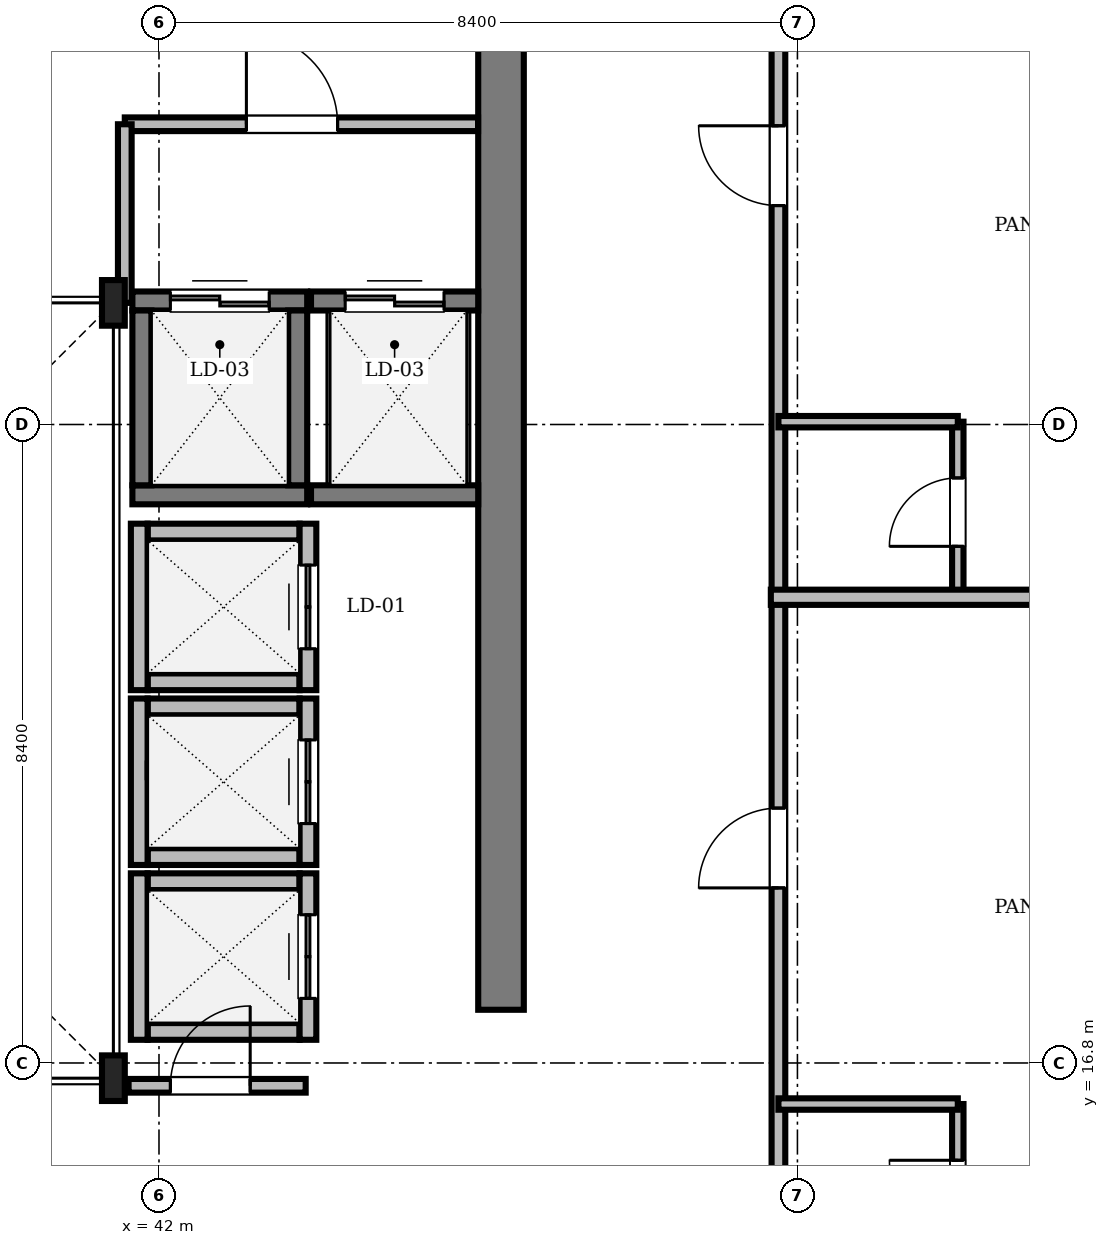
"""IFC4 building model, lengths in metres.
Left out: names, types, materials, properties, quantities, classifications, styles, units other than length and angle.
Written with IfcOpenShell. Run it as: python <this file> out.ifc"""

import sys

from ifc_helpers import new_model, si_unit, direction, frame, frame_2d, origin, origin_2d, place, context, subcontext, project, spatial, rectangle, i_section, extrude, source, transform, mapped, element, fill, save


model = new_model("IFC4")
c1 = context("Model", 3, precision=1e-05, world=origin(), true_north=direction((0.0, 1.0)))
c2 = subcontext(c1, "Body", "Model", "MODEL_VIEW")
j1 = project(units=[si_unit("LENGTHUNIT", "METRE"), si_unit("PLANEANGLEUNIT", "RADIAN")], contexts=[c1])
p1 = place(None, origin())
s1 = spatial("IfcSite", under=j1, at=p1, CompositionType="ELEMENT")
p2 = place(p1, origin())
s2 = spatial("IfcBuilding", under=s1, at=p2, CompositionType="ELEMENT")
p3 = place(p2, frame((0.0, 0.0, 274.3)))
s3 = spatial("IfcBuildingStorey", under=s2, at=p3, CompositionType="ELEMENT", Elevation=274.3)
m1 = source(origin(), c2, "Body", "SweptSolid", [
    extrude(rectangle(XDim=13.15, YDim=0.6, at=frame_2d((6.575, 0.0))), origin(), (0.0, 0.0, 1.0), 3.3),
])
p4 = place(p3, frame((46.5, 17.5, 0.0), z_axis=(0.0, 0.0, 1.0), x_axis=(0.0, 1.0, 0.0)))
e1 = element("IfcWall", 1, at=p4, inside=s3, PredefinedType="SHEAR", context=c2, shape_type="MappedRepresentation", body=[
    mapped(m1, transform((0.0, 0.0, 0.0), scale=1.0)),
])
m2 = source(origin(), c2, "Body", "SweptSolid", [
    extrude(i_section(OverallWidth=0.3, OverallDepth=0.6, WebThickness=0.015, FlangeThickness=0.03, FilletRadius=0.027, at=origin_2d()), origin(), (0.0, 0.0, 1.0), 3.3),
])
for number, where, z_axis, x_axis in (
    (2, (41.4, 16.6, 0.0), (0.0, 0.0, 1.0), (1.0, 0.0, 0.0)),
    (3, (41.4, 26.8, 0.0), (0.0, 0.0, 1.0), (1.0, 0.0, 0.0)),
):
    element("IfcColumn", number, at=place(p3, frame(where, z_axis=z_axis, x_axis=x_axis)), inside=s3, PredefinedType="COLUMN", context=c2, shape_type="MappedRepresentation", body=[
        mapped(m2, transform((0.0, 0.0, 0.0), scale=1.0)),
    ])
m3 = source(origin(), c2, "Body", "SweptSolid", [
    extrude(rectangle(XDim=2.0, YDim=0.22, at=frame_2d((1.0, 0.0))), origin(), (0.0, 0.0, 1.0), 3.3),
])
for number, where, z_axis, x_axis in (
    (4, (41.85, 21.815, 0.0), (0.0, 0.0, 1.0), (1.0, 0.0, 0.0)),
    (5, (41.85, 23.785, 0.0), (0.0, 0.0, 1.0), (1.0, 0.0, 0.0)),
):
    element("IfcWall", number, at=place(p3, frame(where, z_axis=z_axis, x_axis=x_axis)), inside=s3, PredefinedType="SOLIDWALL", context=c2, shape_type="MappedRepresentation", body=[
        mapped(m3, transform((0.0, 0.0, 0.0), scale=1.0)),
    ])
m4 = source(origin(), c2, "Body", "SweptSolid", [
    extrude(rectangle(XDim=2.19, YDim=0.22, at=frame_2d((1.095, 0.0))), origin(), (0.0, 0.0, 1.0), 3.3),
])
p5 = place(p3, frame((41.74, 21.705, 0.0), z_axis=(0.0, 0.0, 1.0), x_axis=(0.0, 1.0, 0.0)))
e6 = element("IfcWall", 6, at=p5, inside=s3, PredefinedType="SOLIDWALL", context=c2, shape_type="MappedRepresentation", body=[
    mapped(m4, transform((0.0, 0.0, 0.0), scale=1.0)),
])
p6 = place(p3, frame((43.96, 21.705, 0.0), z_axis=(0.0, 0.0, 1.0), x_axis=(0.0, 1.0, 0.0)))
e7 = element("IfcWall", 7, at=p6, inside=s3, PredefinedType="SOLIDWALL", context=c2, shape_type="MappedRepresentation", body=[
    mapped(m4, transform((0.0, 0.0, 0.0), scale=1.0)),
])
m5 = source(origin(), c2, "Body", "SweptSolid", [
    extrude(rectangle(XDim=1.1, YDim=2.2, at=frame_2d((0.55, 1.1))), frame((0.0, 0.12, 0.0), z_axis=(0.0, -1.0, 0.0), x_axis=(1.0, 0.0, 0.0)), (0.0, 0.0, 1.0), 0.24),
])
p7 = place(p6, frame((0.545, 0.0, 0.0)))
e8 = element("IfcOpeningElement", 8, at=p7, cuts=e7, PredefinedType="OPENING", context=c2, shape_type="MappedRepresentation", body=[
    mapped(m5, transform((0.0, 0.0, 0.0), scale=1.0)),
])
for number, where, z_axis, x_axis in (
    (9, (41.85, 19.515, 0.0), (0.0, 0.0, 1.0), (1.0, 0.0, 0.0)),
    (10, (41.85, 21.485, 0.0), (0.0, 0.0, 1.0), (1.0, 0.0, 0.0)),
):
    element("IfcWall", number, at=place(p3, frame(where, z_axis=z_axis, x_axis=x_axis)), inside=s3, PredefinedType="SOLIDWALL", context=c2, shape_type="MappedRepresentation", body=[
        mapped(m3, transform((0.0, 0.0, 0.0), scale=1.0)),
    ])
p8 = place(p3, frame((41.74, 19.405, 0.0), z_axis=(0.0, 0.0, 1.0), x_axis=(0.0, 1.0, 0.0)))
e11 = element("IfcWall", 11, at=p8, inside=s3, PredefinedType="SOLIDWALL", context=c2, shape_type="MappedRepresentation", body=[
    mapped(m4, transform((0.0, 0.0, 0.0), scale=1.0)),
])
p9 = place(p3, frame((43.96, 19.405, 0.0), z_axis=(0.0, 0.0, 1.0), x_axis=(0.0, 1.0, 0.0)))
e12 = element("IfcWall", 12, at=p9, inside=s3, PredefinedType="SOLIDWALL", context=c2, shape_type="MappedRepresentation", body=[
    mapped(m4, transform((0.0, 0.0, 0.0), scale=1.0)),
])
p10 = place(p9, frame((0.545, 0.0, 0.0)))
e13 = element("IfcOpeningElement", 13, at=p10, cuts=e12, PredefinedType="OPENING", context=c2, shape_type="MappedRepresentation", body=[
    mapped(m5, transform((0.0, 0.0, 0.0), scale=1.0)),
])
for number, where, z_axis, x_axis in (
    (14, (41.85, 17.215, 0.0), (0.0, 0.0, 1.0), (1.0, 0.0, 0.0)),
    (15, (41.85, 19.185, 0.0), (0.0, 0.0, 1.0), (1.0, 0.0, 0.0)),
):
    element("IfcWall", number, at=place(p3, frame(where, z_axis=z_axis, x_axis=x_axis)), inside=s3, PredefinedType="SOLIDWALL", context=c2, shape_type="MappedRepresentation", body=[
        mapped(m3, transform((0.0, 0.0, 0.0), scale=1.0)),
    ])
p11 = place(p3, frame((41.74, 17.105, 0.0), z_axis=(0.0, 0.0, 1.0), x_axis=(0.0, 1.0, 0.0)))
e16 = element("IfcWall", 16, at=p11, inside=s3, PredefinedType="SOLIDWALL", context=c2, shape_type="MappedRepresentation", body=[
    mapped(m4, transform((0.0, 0.0, 0.0), scale=1.0)),
])
p12 = place(p3, frame((43.96, 17.105, 0.0), z_axis=(0.0, 0.0, 1.0), x_axis=(0.0, 1.0, 0.0)))
e17 = element("IfcWall", 17, at=p12, inside=s3, PredefinedType="SOLIDWALL", context=c2, shape_type="MappedRepresentation", body=[
    mapped(m4, transform((0.0, 0.0, 0.0), scale=1.0)),
])
p13 = place(p12, frame((0.545, 0.0, 0.0)))
e18 = element("IfcOpeningElement", 18, at=p13, cuts=e17, PredefinedType="OPENING", context=c2, shape_type="MappedRepresentation", body=[
    mapped(m5, transform((0.0, 0.0, 0.0), scale=1.0)),
])
m6 = source(origin(), c2, "Body", "SweptSolid", [
    extrude(rectangle(XDim=2.3, YDim=0.25, at=frame_2d((1.15, 0.0))), origin(), (0.0, 0.0, 1.0), 3.3),
])
p14 = place(p3, frame((41.65, 24.275, 0.0), z_axis=(0.0, 0.0, 1.0), x_axis=(1.0, 0.0, 0.0)))
e19 = element("IfcWall", 19, at=p14, inside=s3, PredefinedType="SOLIDWALL", context=c2, shape_type="MappedRepresentation", body=[
    mapped(m6, transform((0.0, 0.0, 0.0), scale=1.0)),
])
p15 = place(p3, frame((41.65, 26.825, 0.0), z_axis=(0.0, 0.0, 1.0), x_axis=(1.0, 0.0, 0.0)))
e20 = element("IfcWall", 20, at=p15, inside=s3, PredefinedType="SOLIDWALL", context=c2, shape_type="MappedRepresentation", body=[
    mapped(m6, transform((0.0, 0.0, 0.0), scale=1.0)),
])
m7 = source(origin(), c2, "Body", "SweptSolid", [
    extrude(rectangle(XDim=1.3, YDim=2.3, at=frame_2d((0.65, 1.15))), frame((0.0, 0.135, 0.0), z_axis=(0.0, -1.0, 0.0), x_axis=(1.0, 0.0, 0.0)), (0.0, 0.0, 1.0), 0.27),
])
p16 = place(p15, frame((0.5, 0.0, 0.0)))
e21 = element("IfcOpeningElement", 21, at=p16, cuts=e20, PredefinedType="OPENING", context=c2, shape_type="MappedRepresentation", body=[
    mapped(m7, transform((0.0, 0.0, 0.0), scale=1.0)),
])
for number, where, z_axis, x_axis in (
    (22, (41.775, 24.4, 0.0), (0.0, 0.0, 1.0), (0.0, 1.0, 0.0)),
    (23, (43.825, 24.4, 0.0), (0.0, 0.0, 1.0), (0.0, 1.0, 0.0)),
):
    element("IfcWall", number, at=place(p3, frame(where, z_axis=z_axis, x_axis=x_axis)), inside=s3, PredefinedType="SOLIDWALL", context=c2, shape_type="MappedRepresentation", body=[
        mapped(m6, transform((0.0, 0.0, 0.0), scale=1.0)),
    ])
m8 = source(origin(), c2, "Body", "SweptSolid", [
    extrude(rectangle(XDim=2.2, YDim=0.25, at=frame_2d((1.1, 0.0))), origin(), (0.0, 0.0, 1.0), 3.3),
])
p17 = place(p3, frame((44.0, 24.275, 0.0), z_axis=(0.0, 0.0, 1.0), x_axis=(1.0, 0.0, 0.0)))
e24 = element("IfcWall", 24, at=p17, inside=s3, PredefinedType="SOLIDWALL", context=c2, shape_type="MappedRepresentation", body=[
    mapped(m8, transform((0.0, 0.0, 0.0), scale=1.0)),
])
p18 = place(p3, frame((44.0, 26.825, 0.0), z_axis=(0.0, 0.0, 1.0), x_axis=(1.0, 0.0, 0.0)))
e25 = element("IfcWall", 25, at=p18, inside=s3, PredefinedType="SOLIDWALL", context=c2, shape_type="MappedRepresentation", body=[
    mapped(m8, transform((0.0, 0.0, 0.0), scale=1.0)),
])
p19 = place(p18, frame((0.45, 0.0, 0.0)))
e26 = element("IfcOpeningElement", 26, at=p19, cuts=e25, PredefinedType="OPENING", context=c2, shape_type="MappedRepresentation", body=[
    mapped(m7, transform((0.0, 0.0, 0.0), scale=1.0)),
])
m9 = source(origin(), c2, "Body", "SweptSolid", [
    extrude(rectangle(XDim=27.15, YDim=0.18, at=frame_2d((13.575, 0.0))), origin(), (0.0, 0.0, 1.0), 2.742),
])
p20 = place(p3, frame((50.15, 13.95, 0.0), z_axis=(0.0, 0.0, 1.0), x_axis=(0.0, 1.0, 0.0)))
e27 = element("IfcWall", 27, at=p20, inside=s3, PredefinedType="PARTITIONING", context=c2, shape_type="MappedRepresentation", body=[
    mapped(m9, transform((0.0, 0.0, 0.0), scale=1.0)),
])
m10 = source(origin(), c2, "Body", "SweptSolid", [
    extrude(rectangle(XDim=1.05, YDim=2.2, at=frame_2d((0.525, 1.1))), frame((0.0, 0.1, 0.0), z_axis=(0.0, -1.0, 0.0), x_axis=(1.0, 0.0, 0.0)), (0.0, 0.0, 1.0), 0.2),
])
p21 = place(p20, frame((5.153, 0.0, 0.0)))
e28 = element("IfcOpeningElement", 28, at=p21, cuts=e27, PredefinedType="OPENING", context=c2, shape_type="MappedRepresentation", body=[
    mapped(m10, transform((0.0, 0.0, 0.0), scale=1.0)),
])
p22 = place(p20, frame((14.13, 0.0, 0.0)))
e29 = element("IfcOpeningElement", 29, at=p22, cuts=e27, PredefinedType="OPENING", context=c2, shape_type="MappedRepresentation", body=[
    mapped(m10, transform((0.0, 0.0, 0.0), scale=1.0)),
])
p23 = place(p20, frame((23.107, 0.0, 0.0)))
e30 = element("IfcOpeningElement", 30, at=p23, cuts=e27, PredefinedType="OPENING", context=c2, shape_type="MappedRepresentation", body=[
    mapped(m10, transform((0.0, 0.0, 0.0), scale=1.0)),
])
m11 = source(origin(), c2, "Body", "SweptSolid", [
    extrude(rectangle(XDim=4.648, YDim=0.18, at=frame_2d((2.324, 0.0))), origin(), (0.0, 0.0, 1.0), 2.932),
])
p24 = place(p3, frame((41.55, 29.15, 0.0), z_axis=(0.0, 0.0, 1.0), x_axis=(1.0, 0.0, 0.0)))
e31 = element("IfcWall", 31, at=p24, inside=s3, PredefinedType="PARTITIONING", context=c2, shape_type="MappedRepresentation", body=[
    mapped(m11, transform((0.0, 0.0, 0.0), scale=1.0)),
])
m12 = source(origin(), c2, "Body", "SweptSolid", [
    extrude(rectangle(XDim=1.2, YDim=2.2, at=frame_2d((0.6, 1.1))), frame((0.0, 0.1, 0.0), z_axis=(0.0, -1.0, 0.0), x_axis=(1.0, 0.0, 0.0)), (0.0, 0.0, 1.0), 0.2),
])
p25 = place(p24, frame((1.6, 0.0, 0.0)))
e32 = element("IfcOpeningElement", 32, at=p25, cuts=e31, PredefinedType="OPENING", context=c2, shape_type="MappedRepresentation", body=[
    mapped(m12, transform((0.0, 0.0, 0.0), scale=1.0)),
])
m13 = source(origin(), c2, "Body", "SweptSolid", [
    extrude(rectangle(XDim=2.33, YDim=0.18, at=frame_2d((1.165, 0.0))), origin(), (0.0, 0.0, 1.0), 2.742),
])
p26 = place(p3, frame((41.6, 16.5, 0.0), z_axis=(0.0, 0.0, 1.0), x_axis=(1.0, 0.0, 0.0)))
e33 = element("IfcWall", 33, at=p26, inside=s3, PredefinedType="PARTITIONING", context=c2, shape_type="MappedRepresentation", body=[
    mapped(m13, transform((0.0, 0.0, 0.0), scale=1.0)),
])
p27 = place(p26, frame((0.55, 0.0, 0.0)))
e34 = element("IfcOpeningElement", 34, at=p27, cuts=e33, PredefinedType="OPENING", context=c2, shape_type="MappedRepresentation", body=[
    mapped(m10, transform((0.0, 0.0, 0.0), scale=1.0)),
])
m14 = source(origin(), c2, "Body", "SweptSolid", [
    extrude(rectangle(XDim=2.29, YDim=0.15, at=frame_2d((1.145, 0.0))), origin(), (0.0, 0.0, 1.0), 2.742),
])
p28 = place(p3, frame((52.51, 13.97, 0.0), z_axis=(0.0, 0.0, 1.0), x_axis=(0.0, 1.0, 0.0)))
e35 = element("IfcWall", 35, at=p28, inside=s3, PredefinedType="PARTITIONING", context=c2, shape_type="MappedRepresentation", body=[
    mapped(m14, transform((0.0, 0.0, 0.0), scale=1.0)),
])
m15 = source(origin(), c2, "Body", "SweptSolid", [
    extrude(rectangle(XDim=0.9, YDim=2.1, at=frame_2d((0.45, 1.05))), frame((0.0, 0.085, 0.0), z_axis=(0.0, -1.0, 0.0), x_axis=(1.0, 0.0, 0.0)), (0.0, 0.0, 1.0), 0.17),
])
p29 = place(p28, frame((0.65, 0.0, 0.0)))
e36 = element("IfcOpeningElement", 36, at=p29, cuts=e35, PredefinedType="OPENING", context=c2, shape_type="MappedRepresentation", body=[
    mapped(m15, transform((0.0, 0.0, 0.0), scale=1.0)),
])
m16 = source(origin(), c2, "Body", "SweptSolid", [
    extrude(rectangle(XDim=2.29, YDim=0.15, at=frame_2d((1.145, 0.0))), origin(), (0.0, 0.0, 1.0), 2.992),
])
p30 = place(p3, frame((52.51, 22.947, 0.0), z_axis=(0.0, 0.0, 1.0), x_axis=(0.0, 1.0, 0.0)))
e37 = element("IfcWall", 37, at=p30, inside=s3, PredefinedType="PARTITIONING", context=c2, shape_type="MappedRepresentation", body=[
    mapped(m16, transform((0.0, 0.0, 0.0), scale=1.0)),
])
p31 = place(p30, frame((0.65, 0.0, 0.0)))
e38 = element("IfcOpeningElement", 38, at=p31, cuts=e37, PredefinedType="OPENING", context=c2, shape_type="MappedRepresentation", body=[
    mapped(m15, transform((0.0, 0.0, 0.0), scale=1.0)),
])
m17 = source(origin(), c2, "Body", "SweptSolid", [
    extrude(rectangle(XDim=9.52, YDim=0.2, at=frame_2d((4.76, 0.0))), origin(), (0.0, 0.0, 1.0), 2.542),
])
p32 = place(p3, frame((50.05, 22.927, 0.0), z_axis=(0.0, 0.0, 1.0), x_axis=(1.0, 0.0, 0.0)))
e39 = element("IfcWall", 39, at=p32, inside=s3, PredefinedType="PARTITIONING", context=c2, shape_type="MappedRepresentation", body=[
    mapped(m17, transform((0.0, 0.0, 0.0), scale=1.0)),
])
m18 = source(origin(), c2, "Body", "SweptSolid", [
    extrude(rectangle(XDim=2.36, YDim=0.15, at=frame_2d((1.18, 0.0))), origin(), (0.0, 0.0, 1.0), 2.742),
])
p33 = place(p3, frame((50.15, 16.26, 0.0), z_axis=(0.0, 0.0, 1.0), x_axis=(1.0, 0.0, 0.0)))
e40 = element("IfcWall", 40, at=p33, inside=s3, PredefinedType="PARTITIONING", context=c2, shape_type="MappedRepresentation", body=[
    mapped(m18, transform((0.0, 0.0, 0.0), scale=1.0)),
])
m19 = source(origin(), c2, "Body", "SweptSolid", [
    extrude(rectangle(XDim=2.36, YDim=0.15, at=frame_2d((1.18, 0.0))), origin(), (0.0, 0.0, 1.0), 3.3),
])
p34 = place(p3, frame((50.15, 25.237, 0.0), z_axis=(0.0, 0.0, 1.0), x_axis=(1.0, 0.0, 0.0)))
e41 = element("IfcWall", 41, at=p34, inside=s3, PredefinedType="PARTITIONING", context=c2, shape_type="MappedRepresentation", body=[
    mapped(m19, transform((0.0, 0.0, 0.0), scale=1.0)),
])
m20 = source(origin(), c2, "Body", "SweptSolid", [
    extrude(rectangle(XDim=2.35, YDim=0.18, at=frame_2d((1.175, 0.0))), origin(), (0.0, 0.0, 1.0), 2.932),
])
p35 = place(p3, frame((41.55, 26.8, 0.0), z_axis=(0.0, 0.0, 1.0), x_axis=(0.0, 1.0, 0.0)))
e42 = element("IfcWall", 42, at=p35, inside=s3, PredefinedType="PARTITIONING", context=c2, shape_type="MappedRepresentation", body=[
    mapped(m20, transform((0.0, 0.0, 0.0), scale=1.0)),
])
m21 = source(origin(), c2, "Body", "SweptSolid", [
    extrude(rectangle(XDim=1.858, YDim=0.18, at=frame_2d((0.929, 0.0))), origin(), (0.0, 0.0, 1.0), 3.3),
])
p36 = place(p3, frame((41.852, 20.65, 0.0), z_axis=(0.0, 0.0, 1.0), x_axis=(1.0, 0.0, 0.0)))
e43 = element("IfcWall", 43, at=p36, inside=s3, PredefinedType="PARTITIONING", context=c2, shape_type="MappedRepresentation", body=[
    mapped(m21, transform((0.0, 0.0, 0.0), scale=1.0)),
])
m22 = source(origin(), c2, "Body", "SweptSolid", [
    extrude(rectangle(XDim=1.1, YDim=2.2, at=frame_2d((0.55, 1.1))), frame((0.0, 0.025, 0.0), z_axis=(0.0, -1.0, 0.0), x_axis=(1.0, 0.0, 0.0)), (0.0, 0.0, 1.0), 0.05),
])
p37 = place(p7, origin())
e44 = element("IfcDoor", 44, at=p37, inside=s3, OperationType="DOUBLE_DOOR_SLIDING", PredefinedType="DOOR", context=c2, shape_type="MappedRepresentation", body=[
    mapped(m22, transform((0.0, 0.0, 0.0), scale=1.0)),
])
fill(e8, e44)
p38 = place(p10, origin())
e45 = element("IfcDoor", 45, at=p38, inside=s3, OperationType="DOUBLE_DOOR_SLIDING", PredefinedType="DOOR", context=c2, shape_type="MappedRepresentation", body=[
    mapped(m22, transform((0.0, 0.0, 0.0), scale=1.0)),
])
fill(e13, e45)
p39 = place(p13, origin())
e46 = element("IfcDoor", 46, at=p39, inside=s3, OperationType="DOUBLE_DOOR_SLIDING", PredefinedType="DOOR", context=c2, shape_type="MappedRepresentation", body=[
    mapped(m22, transform((0.0, 0.0, 0.0), scale=1.0)),
])
fill(e18, e46)
m23 = source(origin(), c2, "Body", "SweptSolid", [
    extrude(rectangle(XDim=1.3, YDim=2.3, at=frame_2d((0.65, 1.15))), frame((0.0, 0.025, 0.0), z_axis=(0.0, -1.0, 0.0), x_axis=(1.0, 0.0, 0.0)), (0.0, 0.0, 1.0), 0.05),
])
p40 = place(p16, origin())
e47 = element("IfcDoor", 47, at=p40, inside=s3, OperationType="DOUBLE_DOOR_SLIDING", PredefinedType="DOOR", context=c2, shape_type="MappedRepresentation", body=[
    mapped(m23, transform((0.0, 0.0, 0.0), scale=1.0)),
])
fill(e21, e47)
p41 = place(p19, origin())
e48 = element("IfcDoor", 48, at=p41, inside=s3, OperationType="DOUBLE_DOOR_SLIDING", PredefinedType="DOOR", context=c2, shape_type="MappedRepresentation", body=[
    mapped(m23, transform((0.0, 0.0, 0.0), scale=1.0)),
])
fill(e26, e48)
m24 = source(origin(), c2, "Body", "SweptSolid", [
    extrude(rectangle(XDim=1.05, YDim=2.2, at=frame_2d((0.525, 1.1))), frame((0.0, 0.025, 0.0), z_axis=(0.0, -1.0, 0.0), x_axis=(1.0, 0.0, 0.0)), (0.0, 0.0, 1.0), 0.05),
])
p42 = place(p21, origin())
e49 = element("IfcDoor", 49, at=p42, inside=s3, OperationType="SINGLE_SWING_LEFT", PredefinedType="DOOR", context=c2, shape_type="MappedRepresentation", body=[
    mapped(m24, transform((0.0, 0.0, 0.0), scale=1.0)),
])
fill(e28, e49)
p43 = place(p22, origin())
e50 = element("IfcDoor", 50, at=p43, inside=s3, OperationType="SINGLE_SWING_RIGHT", PredefinedType="DOOR", context=c2, shape_type="MappedRepresentation", body=[
    mapped(m24, transform((0.0, 0.0, 0.0), scale=1.0)),
])
fill(e29, e50)
m25 = source(origin(), c2, "Body", "SweptSolid", [
    extrude(rectangle(XDim=1.2, YDim=2.2, at=frame_2d((0.6, 1.1))), frame((0.0, 0.025, 0.0), z_axis=(0.0, -1.0, 0.0), x_axis=(1.0, 0.0, 0.0)), (0.0, 0.0, 1.0), 0.05),
])
p44 = place(p25, origin())
e51 = element("IfcDoor", 51, at=p44, inside=s3, OperationType="SINGLE_SWING_LEFT", PredefinedType="DOOR", context=c2, shape_type="MappedRepresentation", body=[
    mapped(m25, transform((0.0, 0.0, 0.0), scale=1.0)),
])
fill(e32, e51)
p45 = place(p27, origin())
e52 = element("IfcDoor", 52, at=p45, inside=s3, OperationType="SINGLE_SWING_RIGHT", PredefinedType="DOOR", context=c2, shape_type="MappedRepresentation", body=[
    mapped(m24, transform((0.0, 0.0, 0.0), scale=1.0)),
])
fill(e34, e52)
m26 = source(origin(), c2, "Body", "SweptSolid", [
    extrude(rectangle(XDim=0.9, YDim=2.1, at=frame_2d((0.45, 1.05))), frame((0.0, 0.025, 0.0), z_axis=(0.0, -1.0, 0.0), x_axis=(1.0, 0.0, 0.0)), (0.0, 0.0, 1.0), 0.05),
])
p46 = place(p29, origin())
e53 = element("IfcDoor", 53, at=p46, inside=s3, OperationType="SINGLE_SWING_RIGHT", PredefinedType="DOOR", context=c2, shape_type="MappedRepresentation", body=[
    mapped(m26, transform((0.0, 0.0, 0.0), scale=1.0)),
])
fill(e36, e53)
p47 = place(p31, origin())
e54 = element("IfcDoor", 54, at=p47, inside=s3, OperationType="SINGLE_SWING_LEFT", PredefinedType="DOOR", context=c2, shape_type="MappedRepresentation", body=[
    mapped(m26, transform((0.0, 0.0, 0.0), scale=1.0)),
])
fill(e38, e54)
save(model, sys.argv[1])
